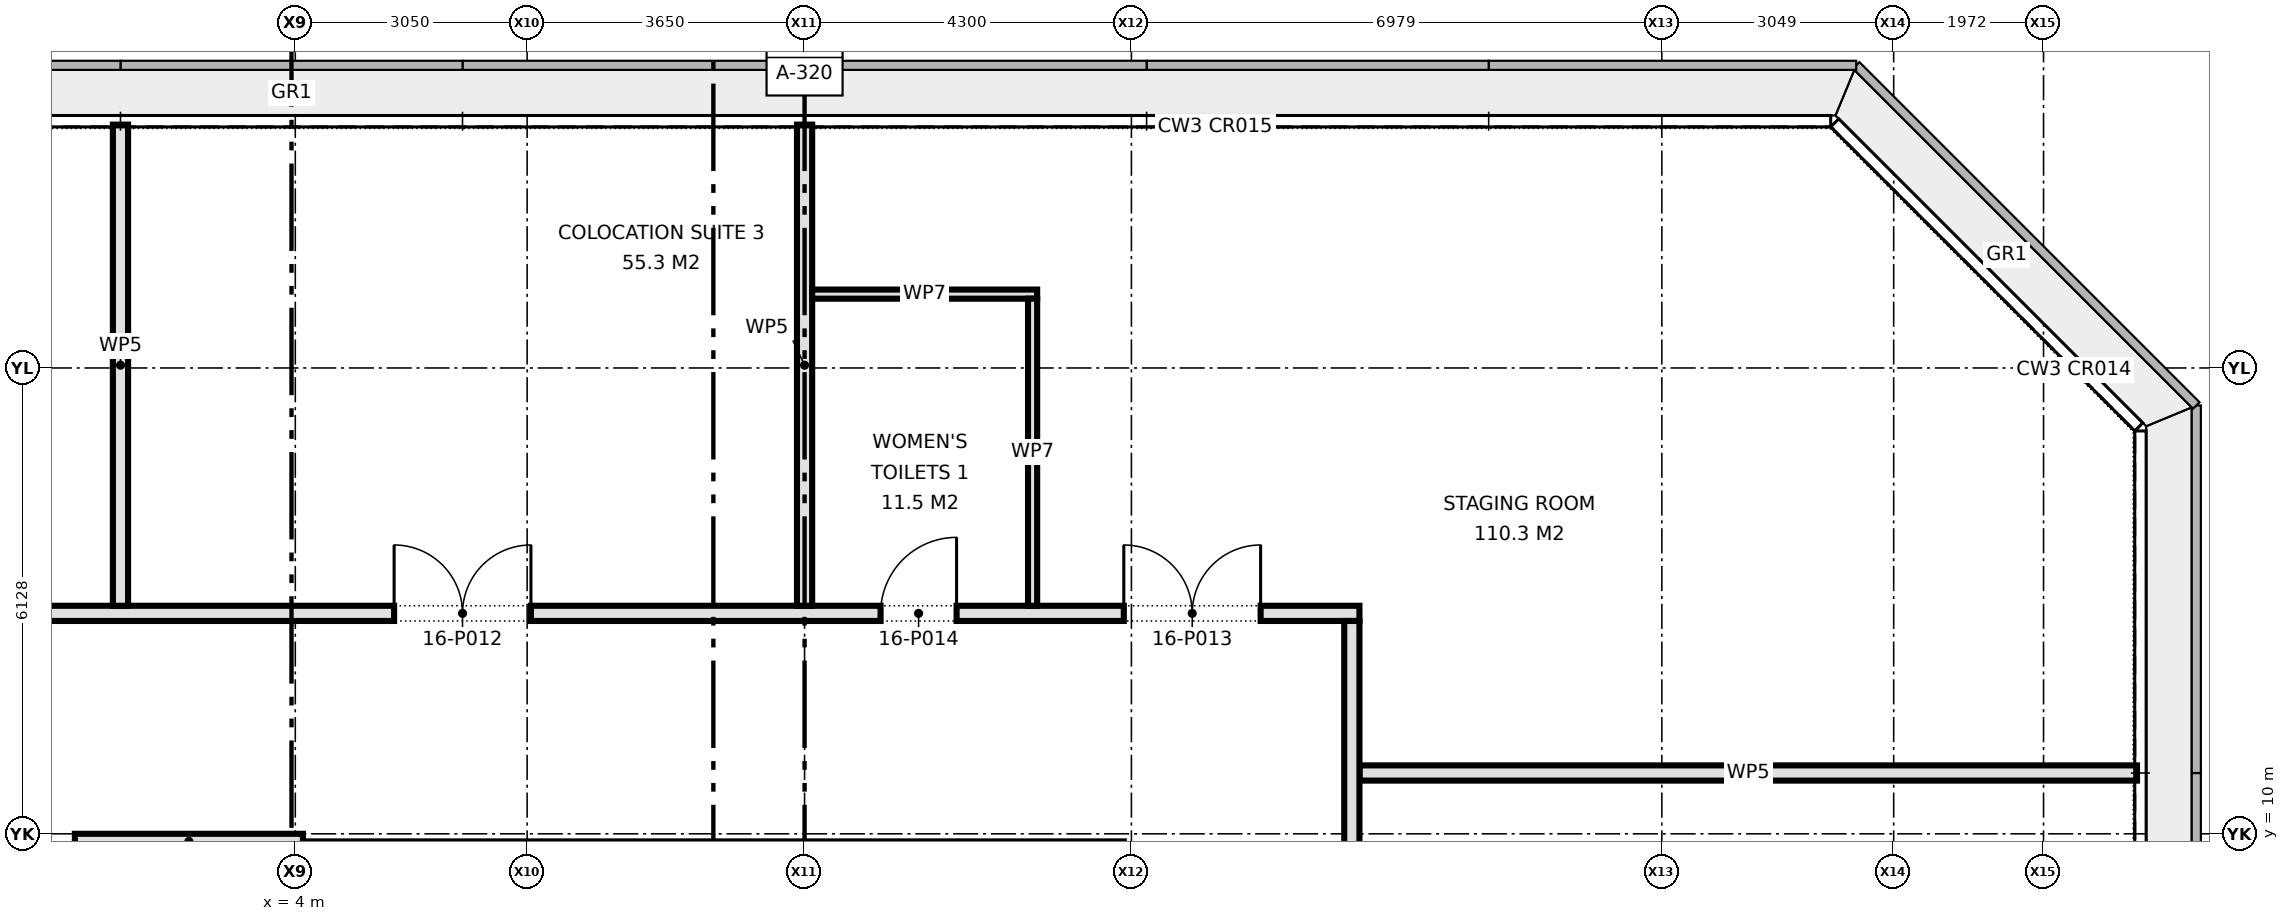
"""IFC4 building model, lengths in metres.
Left out: names, types, materials, properties, quantities, classifications, styles, units other than length and angle.
Written with IfcOpenShell. Run it as: python <this file> out.ifc"""

import sys

from ifc_helpers import new_model, si_unit, direction, frame, frame_2d, origin, place, context, subcontext, project, spatial, rectangle, extrude, element, fill, save


model = new_model("IFC4")
c1 = context("Model", 3, precision=1e-05, world=origin(), true_north=direction((0.0, 1.0)))
c2 = subcontext(c1, "Body", "Model", "MODEL_VIEW")
j1 = project(units=[si_unit("LENGTHUNIT", "METRE"), si_unit("PLANEANGLEUNIT", "RADIAN")], contexts=[c1])
p1 = place(None, origin())
s1 = spatial("IfcSite", under=j1, at=p1, CompositionType="ELEMENT")
p2 = place(p1, origin())
s2 = spatial("IfcBuilding", under=s1, at=p2, CompositionType="ELEMENT")
p3 = place(p2, frame((0.0, 0.0, 73.2)))
s3 = spatial("IfcBuildingStorey", under=s2, at=p3, CompositionType="ELEMENT", Elevation=73.2)
p4 = place(p3, frame((1.1, 9.9, 0.0), z_axis=(0.0, 0.0, 1.0), x_axis=(1.0, 0.0, 0.0)))
e1 = element("IfcWall", 1, at=p4, inside=s3, PredefinedType="PARTITIONING", context=c2, shape_type="SweptSolid", body=[
    extrude(rectangle(XDim=3.0, YDim=0.2, at=frame_2d((1.5, 0.0))), origin(), (0.0, 0.0, 1.0), 3.263),
])
p5 = place(p3, frame((18.0, 10.8, 0.0), z_axis=(0.0, 0.0, 1.0), x_axis=(1.0, 0.0, 0.0)))
e2 = element("IfcWall", 2, at=p5, inside=s3, PredefinedType="PARTITIONING", context=c2, shape_type="SweptSolid", body=[
    extrude(rectangle(XDim=10.23, YDim=0.2, at=frame_2d((5.115, 0.0))), origin(), (0.0, 0.0, 1.0), 4.2),
])
p6 = place(p3, frame((-18.0, 12.9, 0.0), z_axis=(0.0, 0.0, 1.0), x_axis=(1.0, 0.0, 0.0)))
e3 = element("IfcWall", 3, at=p6, inside=s3, PredefinedType="PARTITIONING", context=c2, shape_type="SweptSolid", body=[
    extrude(rectangle(XDim=36.0, YDim=0.2, at=frame_2d((18.0, 0.0))), origin(), (0.0, 0.0, 1.0), 4.2),
])
p7 = place(p6, frame((4.8, 0.0, 0.0)))
e4 = element("IfcOpeningElement", 4, at=p7, cuts=e3, PredefinedType="OPENING", context=c2, shape_type="SweptSolid", body=[
    extrude(rectangle(XDim=1.2, YDim=2.1, at=frame_2d((0.6, 1.05))), frame((0.0, 0.11, 0.0), z_axis=(0.0, -1.0, 0.0), x_axis=(1.0, 0.0, 0.0)), (0.0, 0.0, 1.0), 0.22),
])
p8 = place(p6, frame((14.6, 0.0, 0.0)))
e5 = element("IfcOpeningElement", 5, at=p8, cuts=e3, PredefinedType="OPENING", context=c2, shape_type="SweptSolid", body=[
    extrude(rectangle(XDim=1.2, YDim=2.1, at=frame_2d((0.6, 1.05))), frame((0.0, 0.11, 0.0), z_axis=(0.0, -1.0, 0.0), x_axis=(1.0, 0.0, 0.0)), (0.0, 0.0, 1.0), 0.22),
])
p9 = place(p6, frame((23.3, 0.0, 0.0)))
e6 = element("IfcOpeningElement", 6, at=p9, cuts=e3, PredefinedType="OPENING", context=c2, shape_type="SweptSolid", body=[
    extrude(rectangle(XDim=1.8, YDim=2.1, at=frame_2d((0.9, 1.05))), frame((0.0, 0.11, 0.0), z_axis=(0.0, -1.0, 0.0), x_axis=(1.0, 0.0, 0.0)), (0.0, 0.0, 1.0), 0.22),
])
p10 = place(p6, frame((32.9, 0.0, 0.0)))
e7 = element("IfcOpeningElement", 7, at=p10, cuts=e3, PredefinedType="OPENING", context=c2, shape_type="SweptSolid", body=[
    extrude(rectangle(XDim=1.8, YDim=2.1, at=frame_2d((0.9, 1.05))), frame((0.0, 0.11, 0.0), z_axis=(0.0, -1.0, 0.0), x_axis=(1.0, 0.0, 0.0)), (0.0, 0.0, 1.0), 0.22),
])
p11 = place(p6, frame((29.7, 0.0, 0.0)))
e8 = element("IfcOpeningElement", 8, at=p11, cuts=e3, PredefinedType="OPENING", context=c2, shape_type="SweptSolid", body=[
    extrude(rectangle(XDim=1.0, YDim=2.1, at=frame_2d((0.5, 1.05))), frame((0.0, 0.11, 0.0), z_axis=(0.0, -1.0, 0.0), x_axis=(1.0, 0.0, 0.0)), (0.0, 0.0, 1.0), 0.22),
])
p12 = place(p3, frame((17.9, -12.8, 0.0), z_axis=(0.0, 0.0, 1.0), x_axis=(0.0, 1.0, 0.0)))
e9 = element("IfcWall", 9, at=p12, inside=s3, PredefinedType="PARTITIONING", context=c2, shape_type="SweptSolid", body=[
    extrude(rectangle(XDim=25.6, YDim=0.2, at=frame_2d((12.8, 0.0))), origin(), (0.0, 0.0, 1.0), 4.2),
])
p13 = place(p12, frame((4.4, 0.0, 0.0)))
e10 = element("IfcOpeningElement", 10, at=p13, cuts=e9, PredefinedType="OPENING", context=c2, shape_type="SweptSolid", body=[
    extrude(rectangle(XDim=1.2, YDim=2.1, at=frame_2d((0.6, 1.05))), frame((0.0, 0.11, 0.0), z_axis=(0.0, -1.0, 0.0), x_axis=(1.0, 0.0, 0.0)), (0.0, 0.0, 1.0), 0.22),
])
p14 = place(p12, frame((15.95, 0.0, 0.0)))
e11 = element("IfcOpeningElement", 11, at=p14, cuts=e9, PredefinedType="OPENING", context=c2, shape_type="SweptSolid", body=[
    extrude(rectangle(XDim=1.8, YDim=2.1, at=frame_2d((0.9, 1.05))), frame((0.0, 0.11, 0.0), z_axis=(0.0, -1.0, 0.0), x_axis=(1.0, 0.0, 0.0)), (0.0, 0.0, 1.0), 0.22),
])
for number, where, z_axis, x_axis in (
    (12, (10.7, 13.0, 0.0), (0.0, 0.0, 1.0), (0.0, 1.0, 0.0)),
    (13, (1.7, 13.0, 0.0), (0.0, 0.0, 1.0), (0.0, 1.0, 0.0)),
):
    element("IfcWall", number, at=place(p3, frame(where, z_axis=z_axis, x_axis=x_axis)), inside=s3, PredefinedType="PARTITIONING", context=c2, shape_type="SweptSolid", body=[
        extrude(rectangle(XDim=6.33, YDim=0.2, at=frame_2d((3.165, 0.0))), origin(), (0.0, 0.0, 1.0), 4.2),
    ])
p15 = place(p3, frame((10.8, 17.1, 0.0), z_axis=(0.0, 0.0, 1.0), x_axis=(1.0, 0.0, 0.0)))
e14 = element("IfcWall", 14, at=p15, inside=s3, PredefinedType="PARTITIONING", context=c2, shape_type="SweptSolid", body=[
    extrude(rectangle(XDim=2.96, YDim=0.12, at=frame_2d((1.48, 0.0))), origin(), (0.0, 0.0, 1.0), 4.2),
])
p16 = place(p3, frame((13.7, 13.0, 0.0), z_axis=(0.0, 0.0, 1.0), x_axis=(0.0, 1.0, 0.0)))
e15 = element("IfcWall", 15, at=p16, inside=s3, PredefinedType="PARTITIONING", context=c2, shape_type="SweptSolid", body=[
    extrude(rectangle(XDim=4.04, YDim=0.12, at=frame_2d((2.02, 0.0))), origin(), (0.0, 0.0, 1.0), 4.2),
])
p17 = place(p9, origin())
e16 = element("IfcDoor", 16, at=p17, inside=s3, OperationType="DOUBLE_DOOR_SINGLE_SWING", PredefinedType="DOOR", context=c2, shape_type="SweptSolid", body=[
    extrude(rectangle(XDim=1.8, YDim=2.1, at=frame_2d((0.9, 1.05))), frame((0.0, 0.025, 0.0), z_axis=(0.0, -1.0, 0.0), x_axis=(1.0, 0.0, 0.0)), (0.0, 0.0, 1.0), 0.05),
])
fill(e6, e16)
p18 = place(p10, origin())
e17 = element("IfcDoor", 17, at=p18, inside=s3, OperationType="DOUBLE_DOOR_SINGLE_SWING", PredefinedType="DOOR", context=c2, shape_type="SweptSolid", body=[
    extrude(rectangle(XDim=1.8, YDim=2.1, at=frame_2d((0.9, 1.05))), frame((0.0, 0.025, 0.0), z_axis=(0.0, -1.0, 0.0), x_axis=(1.0, 0.0, 0.0)), (0.0, 0.0, 1.0), 0.05),
])
fill(e7, e17)
p19 = place(p11, origin())
e18 = element("IfcDoor", 18, at=p19, inside=s3, OperationType="SINGLE_SWING_RIGHT", PredefinedType="DOOR", context=c2, shape_type="SweptSolid", body=[
    extrude(rectangle(XDim=1.0, YDim=2.1, at=frame_2d((0.5, 1.05))), frame((0.0, 0.025, 0.0), z_axis=(0.0, -1.0, 0.0), x_axis=(1.0, 0.0, 0.0)), (0.0, 0.0, 1.0), 0.05),
])
fill(e8, e18)
save(model, sys.argv[1])
